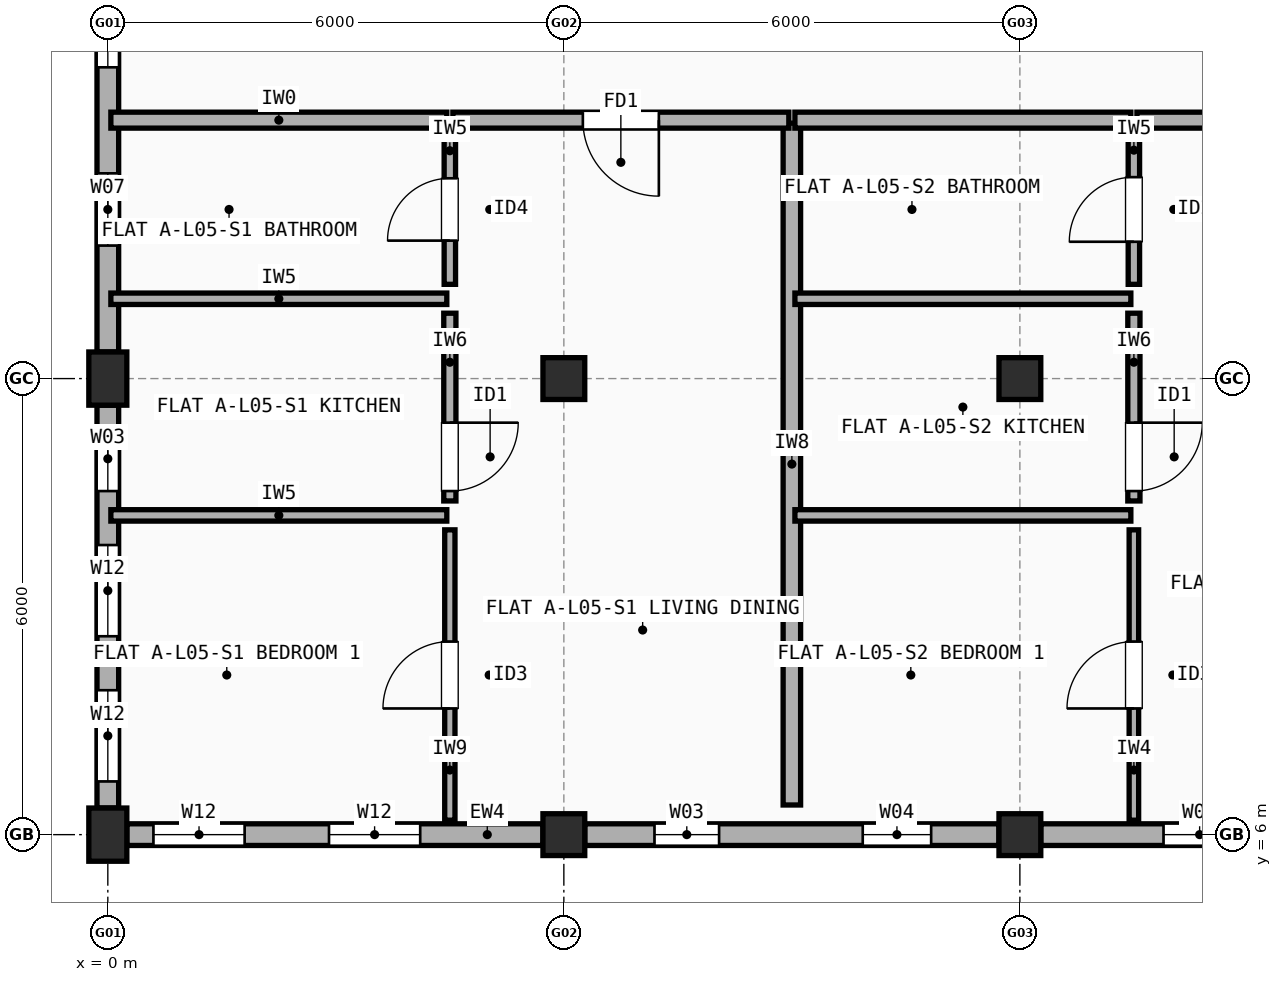
"""IFC4 building model, lengths in metres.
Left out: names, types, materials, properties, quantities, classifications, styles, units other than length and angle.
Written with IfcOpenShell. Run it as: python <this file> out.ifc"""

import sys

from ifc_helpers import new_model, si_unit, direction, frame, frame_2d, origin, origin_2d, place, context, subcontext, project, spatial, rectangle, extrude, element, fill, save


model = new_model("IFC4")
c1 = context("Model", 3, precision=1e-05, world=origin(), true_north=direction((0.0, 1.0)))
c2 = subcontext(c1, "Body", "Model", "MODEL_VIEW")
j1 = project(units=[si_unit("LENGTHUNIT", "METRE"), si_unit("PLANEANGLEUNIT", "RADIAN")], contexts=[c1])
p1 = place(None, origin())
s1 = spatial("IfcSite", under=j1, at=p1, CompositionType="ELEMENT")
p2 = place(p1, origin())
s2 = spatial("IfcBuilding", under=s1, at=p2, CompositionType="ELEMENT")
p3 = place(p2, frame((0.0, 0.0, 17.3)))
s3 = spatial("IfcBuildingStorey", under=s2, at=p3, CompositionType="ELEMENT", Elevation=17.3)
for number, where, z_axis, x_axis in (
    (1, (0.0, 6.0, 0.0), (0.0, 0.0, 1.0), (1.0, 0.0, 0.0)),
    (2, (0.0, 12.0, 0.0), (0.0, 0.0, 1.0), (1.0, 0.0, 0.0)),
):
    element("IfcColumn", number, at=place(p3, frame(where, z_axis=z_axis, x_axis=x_axis)), inside=s3, PredefinedType="COLUMN", context=c2, shape_type="SweptSolid", body=[
        extrude(rectangle(XDim=0.5, YDim=0.7, at=origin_2d()), origin(), (0.0, 0.0, 1.0), 2.965),
    ])
for number, where, z_axis, x_axis in (
    (3, (6.0, 6.0, 0.0), (0.0, 0.0, 1.0), (1.0, 0.0, 0.0)),
    (4, (6.0, 12.0, 0.0), (0.0, 0.0, 1.0), (1.0, 0.0, 0.0)),
    (5, (12.0, 6.0, 0.0), (0.0, 0.0, 1.0), (1.0, 0.0, 0.0)),
    (6, (12.0, 12.0, 0.0), (0.0, 0.0, 1.0), (1.0, 0.0, 0.0)),
):
    element("IfcColumn", number, at=place(p3, frame(where, z_axis=z_axis, x_axis=x_axis)), inside=s3, PredefinedType="COLUMN", context=c2, shape_type="SweptSolid", body=[
        extrude(rectangle(XDim=0.55, YDim=0.55, at=origin_2d()), origin(), (0.0, 0.0, 1.0), 2.965),
    ])
p4 = place(p3, frame((0.25, 6.0, 0.0), z_axis=(0.0, 0.0, 1.0), x_axis=(1.0, 0.0, 0.0)))
e7 = element("IfcWall", 7, at=p4, inside=s3, PredefinedType="STANDARD", context=c2, shape_type="SweptSolid", body=[
    extrude(rectangle(XDim=5.475, YDim=0.285, at=frame_2d((2.738, 0.0))), origin(), (0.0, 0.0, 1.0), 2.447),
])
p5 = place(p4, frame((0.35, 0.0, 0.9)))
e8 = element("IfcOpeningElement", 8, at=p5, cuts=e7, PredefinedType="OPENING", context=c2, shape_type="SweptSolid", body=[
    extrude(rectangle(XDim=1.2, YDim=1.35, at=frame_2d((0.6, 0.675))), frame((0.0, 0.152, 0.0), z_axis=(0.0, -1.0, 0.0), x_axis=(1.0, 0.0, 0.0)), (0.0, 0.0, 1.0), 0.305),
])
p6 = place(p4, frame((2.66, 0.0, 0.9)))
e9 = element("IfcOpeningElement", 9, at=p6, cuts=e7, PredefinedType="OPENING", context=c2, shape_type="SweptSolid", body=[
    extrude(rectangle(XDim=1.2, YDim=1.35, at=frame_2d((0.6, 0.675))), frame((0.0, 0.152, 0.0), z_axis=(0.0, -1.0, 0.0), x_axis=(1.0, 0.0, 0.0)), (0.0, 0.0, 1.0), 0.305),
])
p7 = place(p3, frame((6.275, 6.0, 0.0), z_axis=(0.0, 0.0, 1.0), x_axis=(1.0, 0.0, 0.0)))
e10 = element("IfcWall", 10, at=p7, inside=s3, PredefinedType="STANDARD", context=c2, shape_type="SweptSolid", body=[
    extrude(rectangle(XDim=5.45, YDim=0.285, at=frame_2d((2.725, 0.0))), origin(), (0.0, 0.0, 1.0), 2.447),
])
p8 = place(p7, frame((0.917, 0.0, 0.9)))
e11 = element("IfcOpeningElement", 11, at=p8, cuts=e10, PredefinedType="OPENING", context=c2, shape_type="SweptSolid", body=[
    extrude(rectangle(XDim=0.85, YDim=1.25, at=frame_2d((0.425, 0.625))), frame((0.0, 0.152, 0.0), z_axis=(0.0, -1.0, 0.0), x_axis=(1.0, 0.0, 0.0)), (0.0, 0.0, 1.0), 0.305),
])
p9 = place(p7, frame((3.657, 0.0, 0.9)))
e12 = element("IfcOpeningElement", 12, at=p9, cuts=e10, PredefinedType="OPENING", context=c2, shape_type="SweptSolid", body=[
    extrude(rectangle(XDim=0.9, YDim=1.3, at=frame_2d((0.45, 0.65))), frame((0.0, 0.152, 0.0), z_axis=(0.0, -1.0, 0.0), x_axis=(1.0, 0.0, 0.0)), (0.0, 0.0, 1.0), 0.305),
])
p10 = place(p3, frame((12.275, 6.0, 0.0), z_axis=(0.0, 0.0, 1.0), x_axis=(1.0, 0.0, 0.0)))
e13 = element("IfcWall", 13, at=p10, inside=s3, PredefinedType="STANDARD", context=c2, shape_type="SweptSolid", body=[
    extrude(rectangle(XDim=5.45, YDim=0.285, at=frame_2d((2.725, 0.0))), origin(), (0.0, 0.0, 1.0), 2.447),
])
p11 = place(p10, frame((1.615, 0.0, 0.9)))
e14 = element("IfcOpeningElement", 14, at=p11, cuts=e13, PredefinedType="OPENING", context=c2, shape_type="SweptSolid", body=[
    extrude(rectangle(XDim=0.95, YDim=1.35, at=frame_2d((0.475, 0.675))), frame((0.0, 0.152, 0.0), z_axis=(0.0, -1.0, 0.0), x_axis=(1.0, 0.0, 0.0)), (0.0, 0.0, 1.0), 0.305),
])
p12 = place(p10, frame((4.15, 0.0, 0.9)))
e15 = element("IfcOpeningElement", 15, at=p12, cuts=e13, PredefinedType="OPENING", context=c2, shape_type="SweptSolid", body=[
    extrude(rectangle(XDim=0.95, YDim=1.35, at=frame_2d((0.475, 0.675))), frame((0.0, 0.152, 0.0), z_axis=(0.0, -1.0, 0.0), x_axis=(1.0, 0.0, 0.0)), (0.0, 0.0, 1.0), 0.305),
])
p13 = place(p3, frame((0.0, 17.65, 0.0), z_axis=(0.0, 0.0, 1.0), x_axis=(0.0, -1.0, 0.0)))
e16 = element("IfcWall", 16, at=p13, inside=s3, PredefinedType="STANDARD", context=c2, shape_type="SweptSolid", body=[
    extrude(rectangle(XDim=5.3, YDim=0.285, at=frame_2d((2.65, 0.0))), origin(), (0.0, 0.0, 1.0), 2.447),
])
p14 = place(p13, frame((0.655, 0.0, 0.9)))
e17 = element("IfcOpeningElement", 17, at=p14, cuts=e16, PredefinedType="OPENING", context=c2, shape_type="SweptSolid", body=[
    extrude(rectangle(XDim=0.9, YDim=1.3, at=frame_2d((0.45, 0.65))), frame((0.0, 0.152, 0.0), z_axis=(0.0, -1.0, 0.0), x_axis=(1.0, 0.0, 0.0)), (0.0, 0.0, 1.0), 0.305),
])
p15 = place(p13, frame((2.95, 0.0, 0.9)))
e18 = element("IfcOpeningElement", 18, at=p15, cuts=e16, PredefinedType="OPENING", context=c2, shape_type="SweptSolid", body=[
    extrude(rectangle(XDim=0.95, YDim=1.35, at=frame_2d((0.475, 0.675))), frame((0.0, 0.152, 0.0), z_axis=(0.0, -1.0, 0.0), x_axis=(1.0, 0.0, 0.0)), (0.0, 0.0, 1.0), 0.305),
])
p16 = place(p3, frame((0.0, 11.65, 0.0), z_axis=(0.0, 0.0, 1.0), x_axis=(0.0, -1.0, 0.0)))
e19 = element("IfcWall", 19, at=p16, inside=s3, PredefinedType="STANDARD", context=c2, shape_type="SweptSolid", body=[
    extrude(rectangle(XDim=5.3, YDim=0.285, at=frame_2d((2.65, 0.0))), origin(), (0.0, 0.0, 1.0), 2.447),
])
p17 = place(p16, frame((0.28, 0.0, 0.9)))
e20 = element("IfcOpeningElement", 20, at=p17, cuts=e19, PredefinedType="OPENING", context=c2, shape_type="SweptSolid", body=[
    extrude(rectangle(XDim=0.85, YDim=1.25, at=frame_2d((0.425, 0.625))), frame((0.0, 0.152, 0.0), z_axis=(0.0, -1.0, 0.0), x_axis=(1.0, 0.0, 0.0)), (0.0, 0.0, 1.0), 0.305),
])
p18 = place(p16, frame((1.84, 0.0, 0.9)))
e21 = element("IfcOpeningElement", 21, at=p18, cuts=e19, PredefinedType="OPENING", context=c2, shape_type="SweptSolid", body=[
    extrude(rectangle(XDim=1.2, YDim=1.35, at=frame_2d((0.6, 0.675))), frame((0.0, 0.152, 0.0), z_axis=(0.0, -1.0, 0.0), x_axis=(1.0, 0.0, 0.0)), (0.0, 0.0, 1.0), 0.305),
])
p19 = place(p16, frame((3.75, 0.0, 0.9)))
e22 = element("IfcOpeningElement", 22, at=p19, cuts=e19, PredefinedType="OPENING", context=c2, shape_type="SweptSolid", body=[
    extrude(rectangle(XDim=1.2, YDim=1.35, at=frame_2d((0.6, 0.675))), frame((0.0, 0.152, 0.0), z_axis=(0.0, -1.0, 0.0), x_axis=(1.0, 0.0, 0.0)), (0.0, 0.0, 1.0), 0.305),
])
p20 = place(p3, frame((9.0, 6.39, 0.0), z_axis=(0.0, 0.0, 1.0), x_axis=(0.0, 1.0, 0.0)))
e23 = element("IfcWall", 23, at=p20, inside=s3, PredefinedType="SOLIDWALL", context=c2, shape_type="SweptSolid", body=[
    extrude(rectangle(XDim=8.97, YDim=0.23, at=frame_2d((4.485, 0.0))), origin(), (0.0, 0.0, 1.0), 2.548),
])
p21 = place(p3, frame((0.04, 15.4, 0.0), z_axis=(0.0, 0.0, 1.0), x_axis=(1.0, 0.0, 0.0)))
e24 = element("IfcWall", 24, at=p21, inside=s3, PredefinedType="SOLIDWALL", context=c2, shape_type="SweptSolid", body=[
    extrude(rectangle(XDim=4.42, YDim=0.21, at=frame_2d((2.21, 0.0))), origin(), (0.0, 0.0, 1.0), 2.447),
])
p22 = place(p3, frame((4.54, 15.4, 0.0), z_axis=(0.0, 0.0, 1.0), x_axis=(1.0, 0.0, 0.0)))
e25 = element("IfcWall", 25, at=p22, inside=s3, PredefinedType="SOLIDWALL", context=c2, shape_type="SweptSolid", body=[
    extrude(rectangle(XDim=4.42, YDim=0.21, at=frame_2d((2.21, 0.0))), origin(), (0.0, 0.0, 1.0), 2.508),
])
p23 = place(p22, frame((1.71, 0.0, 0.0)))
e26 = element("IfcOpeningElement", 26, at=p23, cuts=e25, PredefinedType="OPENING", context=c2, shape_type="SweptSolid", body=[
    extrude(rectangle(XDim=1.0, YDim=2.15, at=frame_2d((0.5, 1.075))), frame((0.0, 0.115, 0.0), z_axis=(0.0, -1.0, 0.0), x_axis=(1.0, 0.0, 0.0)), (0.0, 0.0, 1.0), 0.23),
])
p24 = place(p3, frame((4.5, 6.19, 0.0), z_axis=(0.0, 0.0, 1.0), x_axis=(0.0, 1.0, 0.0)))
e27 = element("IfcWall", 27, at=p24, inside=s3, PredefinedType="PARTITIONING", context=c2, shape_type="SweptSolid", body=[
    extrude(rectangle(XDim=3.82, YDim=0.135, at=frame_2d((1.91, 0.0))), origin(), (0.0, 0.0, 1.0), 2.965),
])
p25 = place(p24, frame((1.47, 0.0, 0.0)))
e28 = element("IfcOpeningElement", 28, at=p25, cuts=e27, PredefinedType="OPENING", context=c2, shape_type="SweptSolid", body=[
    extrude(rectangle(XDim=0.88, YDim=2.1, at=frame_2d((0.44, 1.05))), frame((0.0, 0.077, 0.0), z_axis=(0.0, -1.0, 0.0), x_axis=(1.0, 0.0, 0.0)), (0.0, 0.0, 1.0), 0.155),
])
p26 = place(p3, frame((4.5, 10.39, 0.0), z_axis=(0.0, 0.0, 1.0), x_axis=(0.0, 1.0, 0.0)))
e29 = element("IfcWall", 29, at=p26, inside=s3, PredefinedType="PLUMBINGWALL", context=c2, shape_type="SweptSolid", body=[
    extrude(rectangle(XDim=2.47, YDim=0.16, at=frame_2d((1.235, 0.0))), origin(), (0.0, 0.0, 1.0), 2.408),
])
p27 = place(p26, frame((0.13, 0.0, 0.0)))
e30 = element("IfcOpeningElement", 30, at=p27, cuts=e29, PredefinedType="OPENING", context=c2, shape_type="SweptSolid", body=[
    extrude(rectangle(XDim=0.9, YDim=2.1, at=frame_2d((0.45, 1.05))), frame((0.0, 0.09, 0.0), z_axis=(0.0, -1.0, 0.0), x_axis=(1.0, 0.0, 0.0)), (0.0, 0.0, 1.0), 0.18),
])
p28 = place(p3, frame((4.5, 13.24, 0.0), z_axis=(0.0, 0.0, 1.0), x_axis=(0.0, 1.0, 0.0)))
e31 = element("IfcWall", 31, at=p28, inside=s3, PredefinedType="PARTITIONING", context=c2, shape_type="SweptSolid", body=[
    extrude(rectangle(XDim=1.97, YDim=0.15, at=frame_2d((0.985, 0.0))), origin(), (0.0, 0.0, 1.0), 2.965),
])
p29 = place(p28, frame((0.575, 0.0, 0.0)))
e32 = element("IfcOpeningElement", 32, at=p29, cuts=e31, PredefinedType="OPENING", context=c2, shape_type="SweptSolid", body=[
    extrude(rectangle(XDim=0.82, YDim=2.08, at=frame_2d((0.41, 1.04))), frame((0.0, 0.085, 0.0), z_axis=(0.0, -1.0, 0.0), x_axis=(1.0, 0.0, 0.0)), (0.0, 0.0, 1.0), 0.17),
])
for number, where, z_axis, x_axis in (
    (33, (0.04, 10.2, 0.0), (0.0, 0.0, 1.0), (1.0, 0.0, 0.0)),
    (34, (0.04, 13.05, 0.0), (0.0, 0.0, 1.0), (1.0, 0.0, 0.0)),
):
    element("IfcWall", number, at=place(p3, frame(where, z_axis=z_axis, x_axis=x_axis)), inside=s3, PredefinedType="PARTITIONING", context=c2, shape_type="SweptSolid", body=[
        extrude(rectangle(XDim=4.42, YDim=0.15, at=frame_2d((2.21, 0.0))), origin(), (0.0, 0.0, 1.0), 2.447),
    ])
p30 = place(p3, frame((9.04, 15.4, 0.0), z_axis=(0.0, 0.0, 1.0), x_axis=(1.0, 0.0, 0.0)))
e35 = element("IfcWall", 35, at=p30, inside=s3, PredefinedType="SOLIDWALL", context=c2, shape_type="SweptSolid", body=[
    extrude(rectangle(XDim=4.42, YDim=0.21, at=frame_2d((2.21, 0.0))), origin(), (0.0, 0.0, 1.0), 2.458),
])
p31 = place(p3, frame((13.54, 15.4, 0.0), z_axis=(0.0, 0.0, 1.0), x_axis=(1.0, 0.0, 0.0)))
e36 = element("IfcWall", 36, at=p31, inside=s3, PredefinedType="SOLIDWALL", context=c2, shape_type="SweptSolid", body=[
    extrude(rectangle(XDim=4.42, YDim=0.21, at=frame_2d((2.21, 0.0))), origin(), (0.0, 0.0, 1.0), 2.508),
])
p32 = place(p31, frame((1.72, 0.0, 0.0)))
e37 = element("IfcOpeningElement", 37, at=p32, cuts=e36, PredefinedType="OPENING", context=c2, shape_type="SweptSolid", body=[
    extrude(rectangle(XDim=0.98, YDim=2.15, at=frame_2d((0.49, 1.075))), frame((0.0, 0.115, 0.0), z_axis=(0.0, -1.0, 0.0), x_axis=(1.0, 0.0, 0.0)), (0.0, 0.0, 1.0), 0.23),
])
p33 = place(p3, frame((13.5, 6.19, 0.0), z_axis=(0.0, 0.0, 1.0), x_axis=(0.0, 1.0, 0.0)))
e38 = element("IfcWall", 38, at=p33, inside=s3, PredefinedType="PARTITIONING", context=c2, shape_type="SweptSolid", body=[
    extrude(rectangle(XDim=3.82, YDim=0.125, at=frame_2d((1.91, 0.0))), origin(), (0.0, 0.0, 1.0), 2.965),
])
p34 = place(p33, frame((1.47, 0.0, 0.0)))
e39 = element("IfcOpeningElement", 39, at=p34, cuts=e38, PredefinedType="OPENING", context=c2, shape_type="SweptSolid", body=[
    extrude(rectangle(XDim=0.88, YDim=2.1, at=frame_2d((0.44, 1.05))), frame((0.0, 0.073, 0.0), z_axis=(0.0, -1.0, 0.0), x_axis=(1.0, 0.0, 0.0)), (0.0, 0.0, 1.0), 0.145),
])
p35 = place(p3, frame((13.5, 10.39, 0.0), z_axis=(0.0, 0.0, 1.0), x_axis=(0.0, 1.0, 0.0)))
e40 = element("IfcWall", 40, at=p35, inside=s3, PredefinedType="PLUMBINGWALL", context=c2, shape_type="SweptSolid", body=[
    extrude(rectangle(XDim=2.47, YDim=0.16, at=frame_2d((1.235, 0.0))), origin(), (0.0, 0.0, 1.0), 2.508),
])
p36 = place(p35, frame((0.13, 0.0, 0.0)))
e41 = element("IfcOpeningElement", 41, at=p36, cuts=e40, PredefinedType="OPENING", context=c2, shape_type="SweptSolid", body=[
    extrude(rectangle(XDim=0.9, YDim=2.1, at=frame_2d((0.45, 1.05))), frame((0.0, 0.09, 0.0), z_axis=(0.0, -1.0, 0.0), x_axis=(1.0, 0.0, 0.0)), (0.0, 0.0, 1.0), 0.18),
])
p37 = place(p3, frame((13.5, 13.24, 0.0), z_axis=(0.0, 0.0, 1.0), x_axis=(0.0, 1.0, 0.0)))
e42 = element("IfcWall", 42, at=p37, inside=s3, PredefinedType="PARTITIONING", context=c2, shape_type="SweptSolid", body=[
    extrude(rectangle(XDim=1.97, YDim=0.15, at=frame_2d((0.985, 0.0))), origin(), (0.0, 0.0, 1.0), 2.965),
])
p38 = place(p37, frame((0.56, 0.0, 0.0)))
e43 = element("IfcOpeningElement", 43, at=p38, cuts=e42, PredefinedType="OPENING", context=c2, shape_type="SweptSolid", body=[
    extrude(rectangle(XDim=0.85, YDim=2.1, at=frame_2d((0.425, 1.05))), frame((0.0, 0.085, 0.0), z_axis=(0.0, -1.0, 0.0), x_axis=(1.0, 0.0, 0.0)), (0.0, 0.0, 1.0), 0.17),
])
p39 = place(p3, frame((9.04, 10.2, 0.0), z_axis=(0.0, 0.0, 1.0), x_axis=(1.0, 0.0, 0.0)))
e44 = element("IfcWall", 44, at=p39, inside=s3, PredefinedType="PARTITIONING", context=c2, shape_type="SweptSolid", body=[
    extrude(rectangle(XDim=4.42, YDim=0.15, at=frame_2d((2.21, 0.0))), origin(), (0.0, 0.0, 1.0), 2.508),
])
p40 = place(p3, frame((9.04, 13.05, 0.0), z_axis=(0.0, 0.0, 1.0), x_axis=(1.0, 0.0, 0.0)))
e45 = element("IfcWall", 45, at=p40, inside=s3, PredefinedType="PARTITIONING", context=c2, shape_type="SweptSolid", body=[
    extrude(rectangle(XDim=4.42, YDim=0.15, at=frame_2d((2.21, 0.0))), origin(), (0.0, 0.0, 1.0), 2.458),
])
p41 = place(p5, origin())
e46 = element("IfcWindow", 46, at=p41, inside=s3, PartitioningType="SINGLE_PANEL", PredefinedType="WINDOW", context=c2, shape_type="SweptSolid", body=[
    extrude(rectangle(XDim=1.2, YDim=1.35, at=frame_2d((0.6, 0.675))), frame((0.0, 0.03, 0.0), z_axis=(0.0, -1.0, 0.0), x_axis=(1.0, 0.0, 0.0)), (0.0, 0.0, 1.0), 0.06),
])
fill(e8, e46)
p42 = place(p6, origin())
e47 = element("IfcWindow", 47, at=p42, inside=s3, PartitioningType="SINGLE_PANEL", PredefinedType="WINDOW", context=c2, shape_type="SweptSolid", body=[
    extrude(rectangle(XDim=1.2, YDim=1.35, at=frame_2d((0.6, 0.675))), frame((0.0, 0.03, 0.0), z_axis=(0.0, -1.0, 0.0), x_axis=(1.0, 0.0, 0.0)), (0.0, 0.0, 1.0), 0.06),
])
fill(e9, e47)
p43 = place(p8, origin())
e48 = element("IfcWindow", 48, at=p43, inside=s3, PartitioningType="SINGLE_PANEL", PredefinedType="WINDOW", context=c2, shape_type="SweptSolid", body=[
    extrude(rectangle(XDim=0.85, YDim=1.25, at=frame_2d((0.425, 0.625))), frame((0.0, 0.03, 0.0), z_axis=(0.0, -1.0, 0.0), x_axis=(1.0, 0.0, 0.0)), (0.0, 0.0, 1.0), 0.06),
])
fill(e11, e48)
p44 = place(p9, origin())
e49 = element("IfcWindow", 49, at=p44, inside=s3, PartitioningType="SINGLE_PANEL", PredefinedType="WINDOW", context=c2, shape_type="SweptSolid", body=[
    extrude(rectangle(XDim=0.9, YDim=1.3, at=frame_2d((0.45, 0.65))), frame((0.0, 0.03, 0.0), z_axis=(0.0, -1.0, 0.0), x_axis=(1.0, 0.0, 0.0)), (0.0, 0.0, 1.0), 0.06),
])
fill(e12, e49)
p45 = place(p11, origin())
e50 = element("IfcWindow", 50, at=p45, inside=s3, PartitioningType="SINGLE_PANEL", PredefinedType="WINDOW", context=c2, shape_type="SweptSolid", body=[
    extrude(rectangle(XDim=0.95, YDim=1.35, at=frame_2d((0.475, 0.675))), frame((0.0, 0.03, 0.0), z_axis=(0.0, -1.0, 0.0), x_axis=(1.0, 0.0, 0.0)), (0.0, 0.0, 1.0), 0.06),
])
fill(e14, e50)
p46 = place(p14, origin())
e51 = element("IfcWindow", 51, at=p46, inside=s3, PartitioningType="SINGLE_PANEL", PredefinedType="WINDOW", context=c2, shape_type="SweptSolid", body=[
    extrude(rectangle(XDim=0.9, YDim=1.3, at=frame_2d((0.45, 0.65))), frame((0.0, 0.03, 0.0), z_axis=(0.0, -1.0, 0.0), x_axis=(1.0, 0.0, 0.0)), (0.0, 0.0, 1.0), 0.06),
])
fill(e17, e51)
p47 = place(p15, origin())
e52 = element("IfcWindow", 52, at=p47, inside=s3, PartitioningType="SINGLE_PANEL", PredefinedType="WINDOW", context=c2, shape_type="SweptSolid", body=[
    extrude(rectangle(XDim=0.95, YDim=1.35, at=frame_2d((0.475, 0.675))), frame((0.0, 0.03, 0.0), z_axis=(0.0, -1.0, 0.0), x_axis=(1.0, 0.0, 0.0)), (0.0, 0.0, 1.0), 0.06),
])
fill(e18, e52)
p48 = place(p17, origin())
e53 = element("IfcWindow", 53, at=p48, inside=s3, PartitioningType="SINGLE_PANEL", PredefinedType="WINDOW", context=c2, shape_type="SweptSolid", body=[
    extrude(rectangle(XDim=0.85, YDim=1.25, at=frame_2d((0.425, 0.625))), frame((0.0, 0.03, 0.0), z_axis=(0.0, -1.0, 0.0), x_axis=(1.0, 0.0, 0.0)), (0.0, 0.0, 1.0), 0.06),
])
fill(e20, e53)
p49 = place(p18, origin())
e54 = element("IfcWindow", 54, at=p49, inside=s3, PartitioningType="SINGLE_PANEL", PredefinedType="WINDOW", context=c2, shape_type="SweptSolid", body=[
    extrude(rectangle(XDim=1.2, YDim=1.35, at=frame_2d((0.6, 0.675))), frame((0.0, 0.03, 0.0), z_axis=(0.0, -1.0, 0.0), x_axis=(1.0, 0.0, 0.0)), (0.0, 0.0, 1.0), 0.06),
])
fill(e21, e54)
p50 = place(p19, origin())
e55 = element("IfcWindow", 55, at=p50, inside=s3, PartitioningType="SINGLE_PANEL", PredefinedType="WINDOW", context=c2, shape_type="SweptSolid", body=[
    extrude(rectangle(XDim=1.2, YDim=1.35, at=frame_2d((0.6, 0.675))), frame((0.0, 0.03, 0.0), z_axis=(0.0, -1.0, 0.0), x_axis=(1.0, 0.0, 0.0)), (0.0, 0.0, 1.0), 0.06),
])
fill(e22, e55)
p51 = place(p23, origin())
e56 = element("IfcDoor", 56, at=p51, inside=s3, OperationType="SINGLE_SWING_RIGHT", PredefinedType="DOOR", context=c2, shape_type="SweptSolid", body=[
    extrude(rectangle(XDim=1.0, YDim=2.15, at=frame_2d((0.5, 1.075))), frame((0.0, 0.025, 0.0), z_axis=(0.0, -1.0, 0.0), x_axis=(1.0, 0.0, 0.0)), (0.0, 0.0, 1.0), 0.05),
])
fill(e26, e56)
p52 = place(p25, origin())
e57 = element("IfcDoor", 57, at=p52, inside=s3, OperationType="SINGLE_SWING_LEFT", PredefinedType="DOOR", context=c2, shape_type="SweptSolid", body=[
    extrude(rectangle(XDim=0.88, YDim=2.1, at=frame_2d((0.44, 1.05))), frame((0.0, 0.025, 0.0), z_axis=(0.0, -1.0, 0.0), x_axis=(1.0, 0.0, 0.0)), (0.0, 0.0, 1.0), 0.05),
])
fill(e28, e57)
p53 = place(p27, origin())
e58 = element("IfcDoor", 58, at=p53, inside=s3, OperationType="SINGLE_SWING_RIGHT", PredefinedType="DOOR", context=c2, shape_type="SweptSolid", body=[
    extrude(rectangle(XDim=0.9, YDim=2.1, at=frame_2d((0.45, 1.05))), frame((0.0, 0.025, 0.0), z_axis=(0.0, -1.0, 0.0), x_axis=(1.0, 0.0, 0.0)), (0.0, 0.0, 1.0), 0.05),
])
fill(e30, e58)
p54 = place(p29, origin())
e59 = element("IfcDoor", 59, at=p54, inside=s3, OperationType="SINGLE_SWING_LEFT", PredefinedType="DOOR", context=c2, shape_type="SweptSolid", body=[
    extrude(rectangle(XDim=0.82, YDim=2.08, at=frame_2d((0.41, 1.04))), frame((0.0, 0.025, 0.0), z_axis=(0.0, -1.0, 0.0), x_axis=(1.0, 0.0, 0.0)), (0.0, 0.0, 1.0), 0.05),
])
fill(e32, e59)
p55 = place(p34, origin())
e60 = element("IfcDoor", 60, at=p55, inside=s3, OperationType="SINGLE_SWING_LEFT", PredefinedType="DOOR", context=c2, shape_type="SweptSolid", body=[
    extrude(rectangle(XDim=0.88, YDim=2.1, at=frame_2d((0.44, 1.05))), frame((0.0, 0.025, 0.0), z_axis=(0.0, -1.0, 0.0), x_axis=(1.0, 0.0, 0.0)), (0.0, 0.0, 1.0), 0.05),
])
fill(e39, e60)
p56 = place(p36, origin())
e61 = element("IfcDoor", 61, at=p56, inside=s3, OperationType="SINGLE_SWING_RIGHT", PredefinedType="DOOR", context=c2, shape_type="SweptSolid", body=[
    extrude(rectangle(XDim=0.9, YDim=2.1, at=frame_2d((0.45, 1.05))), frame((0.0, 0.025, 0.0), z_axis=(0.0, -1.0, 0.0), x_axis=(1.0, 0.0, 0.0)), (0.0, 0.0, 1.0), 0.05),
])
fill(e41, e61)
p57 = place(p38, origin())
e62 = element("IfcDoor", 62, at=p57, inside=s3, OperationType="SINGLE_SWING_LEFT", PredefinedType="DOOR", context=c2, shape_type="SweptSolid", body=[
    extrude(rectangle(XDim=0.85, YDim=2.1, at=frame_2d((0.425, 1.05))), frame((0.0, 0.025, 0.0), z_axis=(0.0, -1.0, 0.0), x_axis=(1.0, 0.0, 0.0)), (0.0, 0.0, 1.0), 0.05),
])
fill(e43, e62)
save(model, sys.argv[1])
